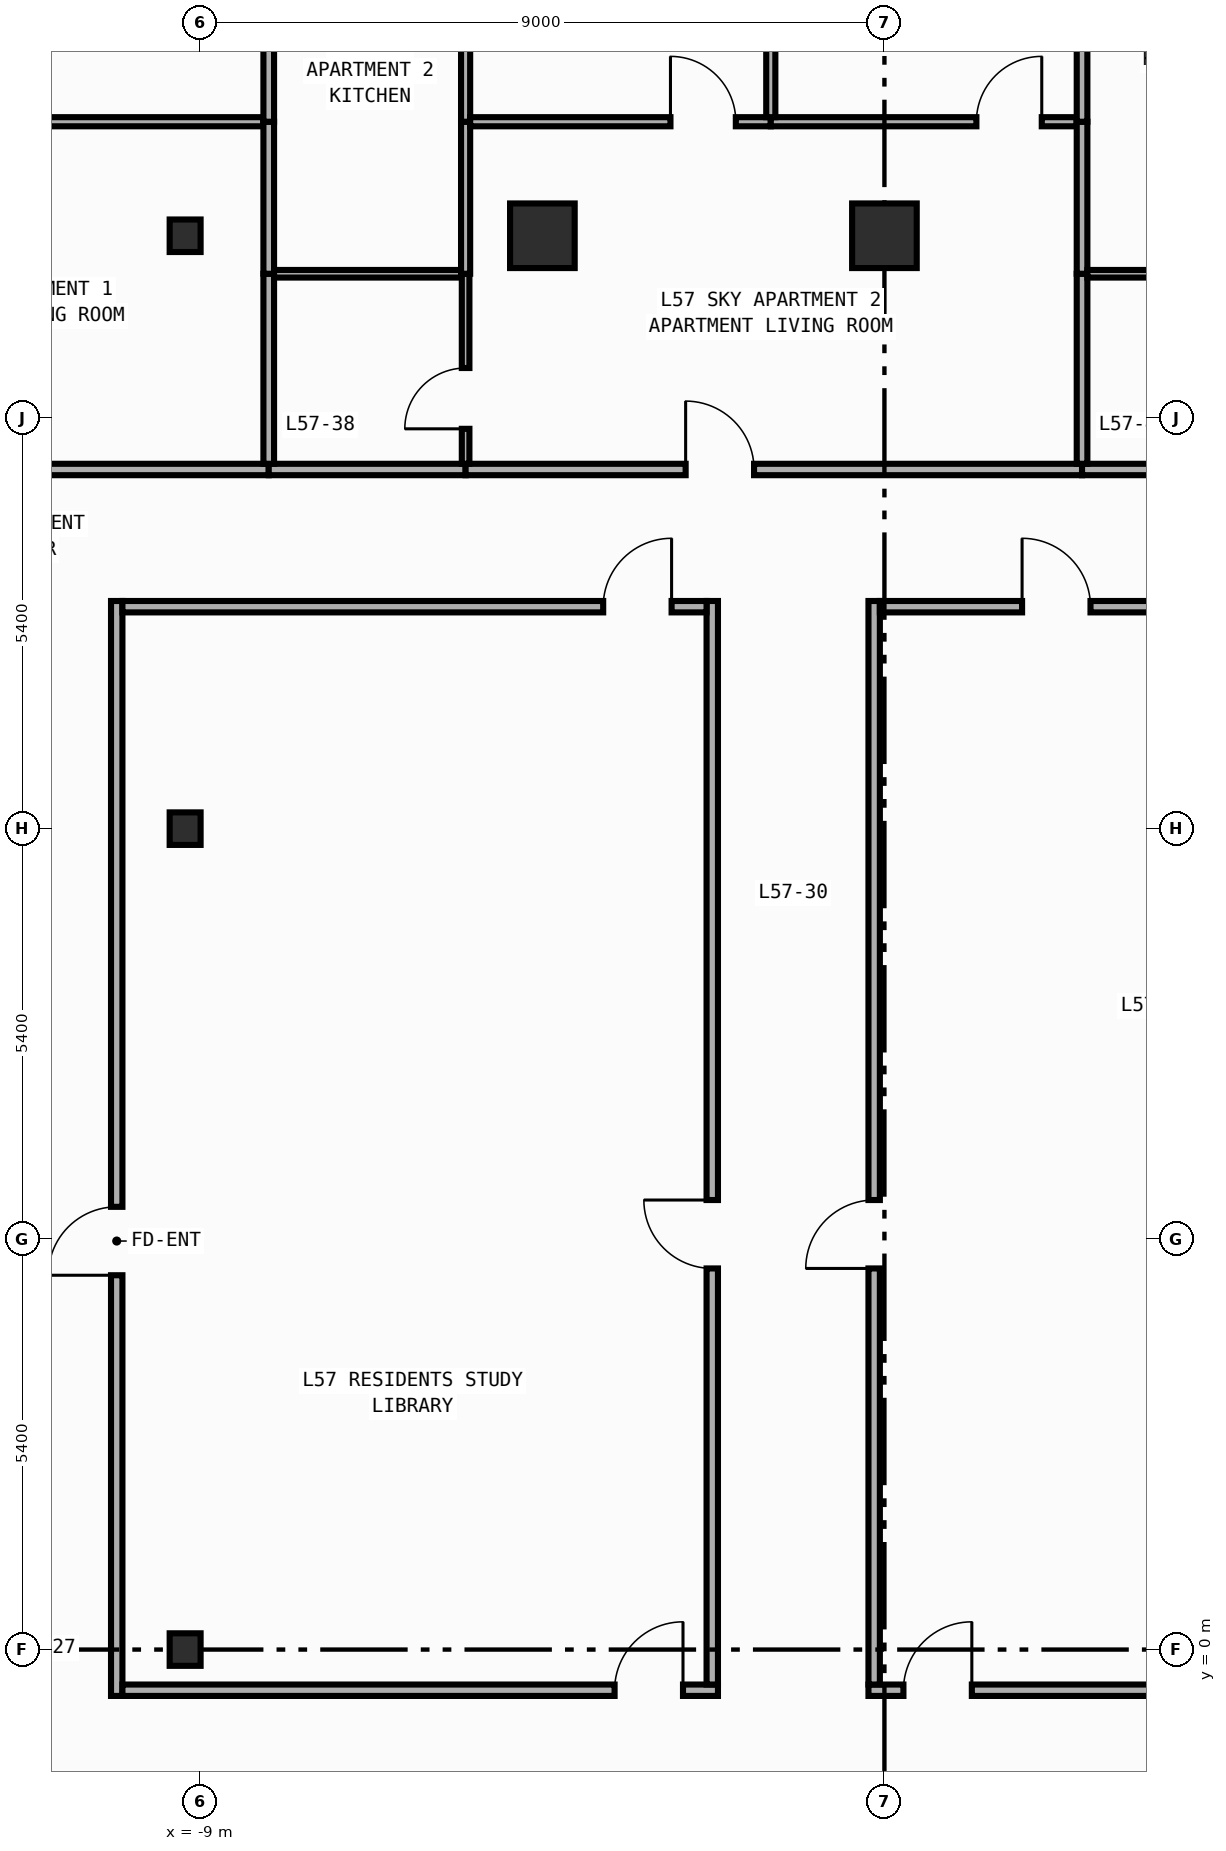
"""IFC4 building model, lengths in metres.
Left out: names, types, materials, properties, quantities, classifications, styles, units other than length and angle.
Written with IfcOpenShell. Run it as: python <this file> out.ifc"""

import sys

from ifc_helpers import new_model, si_unit, direction, frame, frame_2d, origin, origin_2d, place, context, subcontext, project, spatial, rectangle, i_section, extrude, element, fill, save


model = new_model("IFC4")
c1 = context("Model", 3, precision=1e-05, world=origin(), true_north=direction((0.0, 1.0)))
c2 = subcontext(c1, "Body", "Model", "MODEL_VIEW")
j1 = project(units=[si_unit("LENGTHUNIT", "METRE"), si_unit("PLANEANGLEUNIT", "RADIAN")], contexts=[c1])
p1 = place(None, origin())
s1 = spatial("IfcSite", under=j1, at=p1, CompositionType="ELEMENT")
p2 = place(p1, origin())
s2 = spatial("IfcBuilding", under=s1, at=p2, CompositionType="ELEMENT")
p3 = place(p2, frame((0.0, 0.0, 244.0)))
s3 = spatial("IfcBuildingStorey", under=s2, at=p3, CompositionType="ELEMENT", Elevation=244.0)
for number, where, z_axis, x_axis in (
    (1, (-9.2, 0.0, 0.0), (0.0, 0.0, 1.0), (1.0, 0.0, 0.0)),
    (2, (-9.2, 10.8, 0.0), (0.0, 0.0, 1.0), (1.0, 0.0, 0.0)),
    (3, (-9.2, 18.6, 0.0), (0.0, 0.0, 1.0), (1.0, 0.0, 0.0)),
):
    element("IfcColumn", number, at=place(p3, frame(where, z_axis=z_axis, x_axis=x_axis)), inside=s3, PredefinedType="COLUMN", context=c2, shape_type="SweptSolid", body=[
        extrude(i_section(OverallWidth=0.407, OverallDepth=0.428, WebThickness=0.02, FlangeThickness=0.035, FilletRadius=0.022, at=origin_2d()), origin(), (0.0, 0.0, 1.0), 3.6),
    ])
for number, where, z_axis, x_axis in (
    (4, (-4.5, 18.6, 0.0), (0.0, 0.0, 1.0), (1.0, 0.0, 0.0)),
    (5, (0.0, 18.6, 0.0), (0.0, 0.0, 1.0), (1.0, 0.0, 0.0)),
):
    element("IfcColumn", number, at=place(p3, frame(where, z_axis=z_axis, x_axis=x_axis)), inside=s3, PredefinedType="COLUMN", context=c2, shape_type="SweptSolid", body=[
        extrude(rectangle(XDim=0.85, YDim=0.85, at=origin_2d()), origin(), (0.0, 0.0, 1.0), 3.6),
    ])
p4 = place(p3, frame((-10.1, -0.61, 0.0), z_axis=(0.0, 0.0, 1.0), x_axis=(0.0, 1.0, 0.0)))
e6 = element("IfcWall", 6, at=p4, inside=s3, PredefinedType="PARTITIONING", context=c2, shape_type="SweptSolid", body=[
    extrude(rectangle(XDim=14.405, YDim=0.15, at=frame_2d((7.203, 0.0))), origin(), (0.0, 0.0, 1.0), 3.34),
])
p5 = place(p4, frame((5.535, 0.0, 0.0)))
e7 = element("IfcOpeningElement", 7, at=p5, cuts=e6, PredefinedType="OPENING", context=c2, shape_type="SweptSolid", body=[
    extrude(rectangle(XDim=0.9, YDim=2.15, at=frame_2d((0.45, 1.075))), frame((0.0, 0.085, 0.0), z_axis=(0.0, -1.0, 0.0), x_axis=(1.0, 0.0, 0.0)), (0.0, 0.0, 1.0), 0.17),
])
p6 = place(p3, frame((-10.025, -0.535, 0.0), z_axis=(0.0, 0.0, 1.0), x_axis=(1.0, 0.0, 0.0)))
e8 = element("IfcWall", 8, at=p6, inside=s3, PredefinedType="PARTITIONING", context=c2, shape_type="SweptSolid", body=[
    extrude(rectangle(XDim=7.835, YDim=0.15, at=frame_2d((3.917, 0.0))), origin(), (0.0, 0.0, 1.0), 3.34),
])
p7 = place(p6, frame((6.475, 0.0, 0.0)))
e9 = element("IfcOpeningElement", 9, at=p7, cuts=e8, PredefinedType="OPENING", context=c2, shape_type="SweptSolid", body=[
    extrude(rectangle(XDim=0.9, YDim=2.15, at=frame_2d((0.45, 1.075))), frame((0.0, 0.085, 0.0), z_axis=(0.0, -1.0, 0.0), x_axis=(1.0, 0.0, 0.0)), (0.0, 0.0, 1.0), 0.17),
])
p8 = place(p3, frame((-0.21, -0.535, 0.0), z_axis=(0.0, 0.0, 1.0), x_axis=(1.0, 0.0, 0.0)))
e10 = element("IfcWall", 10, at=p8, inside=s3, PredefinedType="PARTITIONING", context=c2, shape_type="SweptSolid", body=[
    extrude(rectangle(XDim=10.235, YDim=0.15, at=frame_2d((5.117, 0.0))), origin(), (0.0, 0.0, 1.0), 3.34),
])
p9 = place(p8, frame((0.46, 0.0, 0.0)))
e11 = element("IfcOpeningElement", 11, at=p9, cuts=e10, PredefinedType="OPENING", context=c2, shape_type="SweptSolid", body=[
    extrude(rectangle(XDim=0.9, YDim=2.15, at=frame_2d((0.45, 1.075))), frame((0.0, 0.085, 0.0), z_axis=(0.0, -1.0, 0.0), x_axis=(1.0, 0.0, 0.0)), (0.0, 0.0, 1.0), 0.17),
])
p10 = place(p3, frame((-2.265, -0.46, 0.0), z_axis=(0.0, 0.0, 1.0), x_axis=(0.0, 1.0, 0.0)))
e12 = element("IfcWall", 12, at=p10, inside=s3, PredefinedType="PARTITIONING", context=c2, shape_type="SweptSolid", body=[
    extrude(rectangle(XDim=14.255, YDim=0.15, at=frame_2d((7.127, 0.0))), origin(), (0.0, 0.0, 1.0), 3.34),
])
p11 = place(p10, frame((5.474, 0.0, 0.0)))
e13 = element("IfcOpeningElement", 13, at=p11, cuts=e12, PredefinedType="OPENING", context=c2, shape_type="SweptSolid", body=[
    extrude(rectangle(XDim=0.9, YDim=2.15, at=frame_2d((0.45, 1.075))), frame((0.0, 0.085, 0.0), z_axis=(0.0, -1.0, 0.0), x_axis=(1.0, 0.0, 0.0)), (0.0, 0.0, 1.0), 0.17),
])
p12 = place(p3, frame((-0.135, -0.46, 0.0), z_axis=(0.0, 0.0, 1.0), x_axis=(0.0, 1.0, 0.0)))
e14 = element("IfcWall", 14, at=p12, inside=s3, PredefinedType="PARTITIONING", context=c2, shape_type="SweptSolid", body=[
    extrude(rectangle(XDim=14.255, YDim=0.15, at=frame_2d((7.127, 0.0))), origin(), (0.0, 0.0, 1.0), 3.34),
])
p13 = place(p12, frame((5.474, 0.0, 0.0)))
e15 = element("IfcOpeningElement", 15, at=p13, cuts=e14, PredefinedType="OPENING", context=c2, shape_type="SweptSolid", body=[
    extrude(rectangle(XDim=0.9, YDim=2.15, at=frame_2d((0.45, 1.075))), frame((0.0, 0.085, 0.0), z_axis=(0.0, -1.0, 0.0), x_axis=(1.0, 0.0, 0.0)), (0.0, 0.0, 1.0), 0.17),
])
p14 = place(p3, frame((-19.31, 15.525, 0.0), z_axis=(0.0, 0.0, 1.0), x_axis=(1.0, 0.0, 0.0)))
e16 = element("IfcWall", 16, at=p14, inside=s3, PredefinedType="PARTITIONING", context=c2, shape_type="SweptSolid", body=[
    extrude(rectangle(XDim=11.21, YDim=0.15, at=frame_2d((5.605, 0.0))), origin(), (0.0, 0.0, 1.0), 3.34),
])
p15 = place(p14, frame((1.481, 0.0, 0.0)))
e17 = element("IfcOpeningElement", 17, at=p15, cuts=e16, PredefinedType="OPENING", context=c2, shape_type="SweptSolid", body=[
    extrude(rectangle(XDim=0.9, YDim=2.15, at=frame_2d((0.45, 1.075))), frame((0.0, 0.085, 0.0), z_axis=(0.0, -1.0, 0.0), x_axis=(1.0, 0.0, 0.0)), (0.0, 0.0, 1.0), 0.17),
])
p16 = place(p3, frame((-8.1, 15.525, 0.0), z_axis=(0.0, 0.0, 1.0), x_axis=(1.0, 0.0, 0.0)))
e18 = element("IfcWall", 18, at=p16, inside=s3, PredefinedType="PARTITIONING", context=c2, shape_type="SweptSolid", body=[
    extrude(rectangle(XDim=2.59, YDim=0.15, at=frame_2d((1.295, 0.0))), origin(), (0.0, 0.0, 1.0), 3.34),
])
p17 = place(p3, frame((-5.51, 15.525, 0.0), z_axis=(0.0, 0.0, 1.0), x_axis=(1.0, 0.0, 0.0)))
e19 = element("IfcWall", 19, at=p17, inside=s3, PredefinedType="PARTITIONING", context=c2, shape_type="SweptSolid", body=[
    extrude(rectangle(XDim=8.11, YDim=0.15, at=frame_2d((4.055, 0.0))), origin(), (0.0, 0.0, 1.0), 3.34),
])
p18 = place(p17, frame((2.895, 0.0, 0.0)))
e20 = element("IfcOpeningElement", 20, at=p18, cuts=e19, PredefinedType="OPENING", context=c2, shape_type="SweptSolid", body=[
    extrude(rectangle(XDim=0.9, YDim=2.15, at=frame_2d((0.45, 1.075))), frame((0.0, 0.085, 0.0), z_axis=(0.0, -1.0, 0.0), x_axis=(1.0, 0.0, 0.0)), (0.0, 0.0, 1.0), 0.17),
])
p19 = place(p3, frame((2.6, 15.525, 0.0), z_axis=(0.0, 0.0, 1.0), x_axis=(1.0, 0.0, 0.0)))
e21 = element("IfcWall", 21, at=p19, inside=s3, PredefinedType="PARTITIONING", context=c2, shape_type="SweptSolid", body=[
    extrude(rectangle(XDim=2.59, YDim=0.15, at=frame_2d((1.295, 0.0))), origin(), (0.0, 0.0, 1.0), 3.34),
])
p20 = place(p3, frame((-10.025, 13.72, 0.0), z_axis=(0.0, 0.0, 1.0), x_axis=(1.0, 0.0, 0.0)))
e22 = element("IfcWall", 22, at=p20, inside=s3, PredefinedType="PARTITIONING", context=c2, shape_type="SweptSolid", body=[
    extrude(rectangle(XDim=7.685, YDim=0.15, at=frame_2d((3.842, 0.0))), origin(), (0.0, 0.0, 1.0), 3.34),
])
p21 = place(p20, frame((6.325, 0.0, 0.0)))
e23 = element("IfcOpeningElement", 23, at=p21, cuts=e22, PredefinedType="OPENING", context=c2, shape_type="SweptSolid", body=[
    extrude(rectangle(XDim=0.9, YDim=2.15, at=frame_2d((0.45, 1.075))), frame((0.0, 0.085, 0.0), z_axis=(0.0, -1.0, 0.0), x_axis=(1.0, 0.0, 0.0)), (0.0, 0.0, 1.0), 0.17),
])
p22 = place(p3, frame((-0.06, 13.72, 0.0), z_axis=(0.0, 0.0, 1.0), x_axis=(1.0, 0.0, 0.0)))
e24 = element("IfcWall", 24, at=p22, inside=s3, PredefinedType="PARTITIONING", context=c2, shape_type="SweptSolid", body=[
    extrude(rectangle(XDim=10.085, YDim=0.15, at=frame_2d((5.042, 0.0))), origin(), (0.0, 0.0, 1.0), 3.34),
])
p23 = place(p22, frame((1.871, 0.0, 0.0)))
e25 = element("IfcOpeningElement", 25, at=p23, cuts=e24, PredefinedType="OPENING", context=c2, shape_type="SweptSolid", body=[
    extrude(rectangle(XDim=0.9, YDim=2.15, at=frame_2d((0.45, 1.075))), frame((0.0, 0.085, 0.0), z_axis=(0.0, -1.0, 0.0), x_axis=(1.0, 0.0, 0.0)), (0.0, 0.0, 1.0), 0.17),
])
p24 = place(p3, frame((-13.745, 20.1, 0.0), z_axis=(0.0, 0.0, 1.0), x_axis=(1.0, 0.0, 0.0)))
e26 = element("IfcWall", 26, at=p24, inside=s3, PredefinedType="PARTITIONING", context=c2, shape_type="SweptSolid", body=[
    extrude(rectangle(XDim=5.575, YDim=0.12, at=frame_2d((2.788, 0.0))), origin(), (0.0, 0.0, 1.0), 3.34),
])
p25 = place(p24, frame((1.725, 0.0, 0.0)))
e27 = element("IfcOpeningElement", 27, at=p25, cuts=e26, PredefinedType="OPENING", context=c2, shape_type="SweptSolid", body=[
    extrude(rectangle(XDim=0.86, YDim=2.15, at=frame_2d((0.43, 1.075))), frame((0.0, 0.07, 0.0), z_axis=(0.0, -1.0, 0.0), x_axis=(1.0, 0.0, 0.0)), (0.0, 0.0, 1.0), 0.14),
])
p26 = place(p3, frame((-8.1, 15.6, 0.0), z_axis=(0.0, 0.0, 1.0), x_axis=(0.0, 1.0, 0.0)))
e28 = element("IfcWall", 28, at=p26, inside=s3, PredefinedType="PARTITIONING", context=c2, shape_type="SweptSolid", body=[
    extrude(rectangle(XDim=2.5, YDim=0.14, at=frame_2d((1.25, 0.0))), origin(), (0.0, 0.0, 1.0), 3.34),
])
p27 = place(p3, frame((-8.1, 18.1, 0.0), z_axis=(0.0, 0.0, 1.0), x_axis=(0.0, 1.0, 0.0)))
e29 = element("IfcWall", 29, at=p27, inside=s3, PredefinedType="PARTITIONING", context=c2, shape_type="SweptSolid", body=[
    extrude(rectangle(XDim=2.0, YDim=0.14, at=frame_2d((1.0, 0.0))), origin(), (0.0, 0.0, 1.0), 3.34),
])
p28 = place(p3, frame((-8.1, 20.1, 0.0), z_axis=(0.0, 0.0, 1.0), x_axis=(0.0, 1.0, 0.0)))
e30 = element("IfcWall", 30, at=p28, inside=s3, PredefinedType="PARTITIONING", context=c2, shape_type="SweptSolid", body=[
    extrude(rectangle(XDim=4.755, YDim=0.14, at=frame_2d((2.377, 0.0))), origin(), (0.0, 0.0, 1.0), 3.34),
])
p29 = place(p3, frame((-8.03, 18.1, 0.0), z_axis=(0.0, 0.0, 1.0), x_axis=(1.0, 0.0, 0.0)))
e31 = element("IfcWall", 31, at=p29, inside=s3, PredefinedType="PARTITIONING", context=c2, shape_type="SweptSolid", body=[
    extrude(rectangle(XDim=2.47, YDim=0.1, at=frame_2d((1.235, 0.0))), origin(), (0.0, 0.0, 1.0), 3.34),
])
p30 = place(p3, frame((-5.51, 15.6, 0.0), z_axis=(0.0, 0.0, 1.0), x_axis=(0.0, 1.0, 0.0)))
e32 = element("IfcWall", 32, at=p30, inside=s3, PredefinedType="PARTITIONING", context=c2, shape_type="SweptSolid", body=[
    extrude(rectangle(XDim=2.5, YDim=0.1, at=frame_2d((1.25, 0.0))), origin(), (0.0, 0.0, 1.0), 3.34),
])
p31 = place(p30, frame((0.46, 0.0, 0.0)))
e33 = element("IfcOpeningElement", 33, at=p31, cuts=e32, PredefinedType="OPENING", context=c2, shape_type="SweptSolid", body=[
    extrude(rectangle(XDim=0.8, YDim=2.1, at=frame_2d((0.4, 1.05))), frame((0.0, 0.06, 0.0), z_axis=(0.0, -1.0, 0.0), x_axis=(1.0, 0.0, 0.0)), (0.0, 0.0, 1.0), 0.12),
])
p32 = place(p3, frame((-5.51, 18.1, 0.0), z_axis=(0.0, 0.0, 1.0), x_axis=(0.0, 1.0, 0.0)))
e34 = element("IfcWall", 34, at=p32, inside=s3, PredefinedType="PARTITIONING", context=c2, shape_type="SweptSolid", body=[
    extrude(rectangle(XDim=2.0, YDim=0.12, at=frame_2d((1.0, 0.0))), origin(), (0.0, 0.0, 1.0), 3.34),
])
p33 = place(p3, frame((-5.51, 20.1, 0.0), z_axis=(0.0, 0.0, 1.0), x_axis=(0.0, 1.0, 0.0)))
e35 = element("IfcWall", 35, at=p33, inside=s3, PredefinedType="PARTITIONING", context=c2, shape_type="SweptSolid", body=[
    extrude(rectangle(XDim=4.755, YDim=0.12, at=frame_2d((2.377, 0.0))), origin(), (0.0, 0.0, 1.0), 3.34),
])
p34 = place(p33, frame((3.495, 0.0, 0.0)))
e36 = element("IfcOpeningElement", 36, at=p34, cuts=e35, PredefinedType="OPENING", context=c2, shape_type="SweptSolid", body=[
    extrude(rectangle(XDim=0.8, YDim=2.1, at=frame_2d((0.4, 1.05))), frame((0.0, 0.07, 0.0), z_axis=(0.0, -1.0, 0.0), x_axis=(1.0, 0.0, 0.0)), (0.0, 0.0, 1.0), 0.14),
])
p35 = place(p3, frame((-5.45, 20.1, 0.0), z_axis=(0.0, 0.0, 1.0), x_axis=(1.0, 0.0, 0.0)))
e37 = element("IfcWall", 37, at=p35, inside=s3, PredefinedType="PARTITIONING", context=c2, shape_type="SweptSolid", body=[
    extrude(rectangle(XDim=3.955, YDim=0.12, at=frame_2d((1.978, 0.0))), origin(), (0.0, 0.0, 1.0), 3.34),
])
p36 = place(p35, frame((2.635, 0.0, 0.0)))
e38 = element("IfcOpeningElement", 38, at=p36, cuts=e37, PredefinedType="OPENING", context=c2, shape_type="SweptSolid", body=[
    extrude(rectangle(XDim=0.86, YDim=2.15, at=frame_2d((0.43, 1.075))), frame((0.0, 0.07, 0.0), z_axis=(0.0, -1.0, 0.0), x_axis=(1.0, 0.0, 0.0)), (0.0, 0.0, 1.0), 0.14),
])
p37 = place(p3, frame((-1.495, 20.1, 0.0), z_axis=(0.0, 0.0, 1.0), x_axis=(1.0, 0.0, 0.0)))
e39 = element("IfcWall", 39, at=p37, inside=s3, PredefinedType="PARTITIONING", context=c2, shape_type="SweptSolid", body=[
    extrude(rectangle(XDim=4.025, YDim=0.12, at=frame_2d((2.013, 0.0))), origin(), (0.0, 0.0, 1.0), 3.34),
])
p38 = place(p37, frame((2.705, 0.0, 0.0)))
e40 = element("IfcOpeningElement", 40, at=p38, cuts=e39, PredefinedType="OPENING", context=c2, shape_type="SweptSolid", body=[
    extrude(rectangle(XDim=0.86, YDim=2.15, at=frame_2d((0.43, 1.075))), frame((0.0, 0.07, 0.0), z_axis=(0.0, -1.0, 0.0), x_axis=(1.0, 0.0, 0.0)), (0.0, 0.0, 1.0), 0.14),
])
p39 = place(p3, frame((2.6, 15.6, 0.0), z_axis=(0.0, 0.0, 1.0), x_axis=(0.0, 1.0, 0.0)))
e41 = element("IfcWall", 41, at=p39, inside=s3, PredefinedType="PARTITIONING", context=c2, shape_type="SweptSolid", body=[
    extrude(rectangle(XDim=2.5, YDim=0.14, at=frame_2d((1.25, 0.0))), origin(), (0.0, 0.0, 1.0), 3.34),
])
p40 = place(p3, frame((2.6, 18.1, 0.0), z_axis=(0.0, 0.0, 1.0), x_axis=(0.0, 1.0, 0.0)))
e42 = element("IfcWall", 42, at=p40, inside=s3, PredefinedType="PARTITIONING", context=c2, shape_type="SweptSolid", body=[
    extrude(rectangle(XDim=2.0, YDim=0.14, at=frame_2d((1.0, 0.0))), origin(), (0.0, 0.0, 1.0), 3.34),
])
p41 = place(p3, frame((-1.495, 20.16, 0.0), z_axis=(0.0, 0.0, 1.0), x_axis=(0.0, 1.0, 0.0)))
e43 = element("IfcWall", 43, at=p41, inside=s3, PredefinedType="PARTITIONING", context=c2, shape_type="SweptSolid", body=[
    extrude(rectangle(XDim=4.695, YDim=0.12, at=frame_2d((2.348, 0.0))), origin(), (0.0, 0.0, 1.0), 3.34),
])
p42 = place(p3, frame((2.6, 20.1, 0.0), z_axis=(0.0, 0.0, 1.0), x_axis=(0.0, 1.0, 0.0)))
e44 = element("IfcWall", 44, at=p42, inside=s3, PredefinedType="PARTITIONING", context=c2, shape_type="SweptSolid", body=[
    extrude(rectangle(XDim=4.755, YDim=0.14, at=frame_2d((2.377, 0.0))), origin(), (0.0, 0.0, 1.0), 3.34),
])
p43 = place(p3, frame((2.67, 18.1, 0.0), z_axis=(0.0, 0.0, 1.0), x_axis=(1.0, 0.0, 0.0)))
e45 = element("IfcWall", 45, at=p43, inside=s3, PredefinedType="PARTITIONING", context=c2, shape_type="SweptSolid", body=[
    extrude(rectangle(XDim=2.47, YDim=0.1, at=frame_2d((1.235, 0.0))), origin(), (0.0, 0.0, 1.0), 3.34),
])
p44 = place(p5, origin())
e46 = element("IfcDoor", 46, at=p44, inside=s3, OperationType="SINGLE_SWING_LEFT", PredefinedType="DOOR", context=c2, shape_type="SweptSolid", body=[
    extrude(rectangle(XDim=0.9, YDim=2.15, at=frame_2d((0.45, 1.075))), frame((0.0, 0.025, 0.0), z_axis=(0.0, -1.0, 0.0), x_axis=(1.0, 0.0, 0.0)), (0.0, 0.0, 1.0), 0.05),
])
fill(e7, e46)
p45 = place(p7, origin())
e47 = element("IfcDoor", 47, at=p45, inside=s3, OperationType="SINGLE_SWING_RIGHT", PredefinedType="DOOR", context=c2, shape_type="SweptSolid", body=[
    extrude(rectangle(XDim=0.9, YDim=2.15, at=frame_2d((0.45, 1.075))), frame((0.0, 0.025, 0.0), z_axis=(0.0, -1.0, 0.0), x_axis=(1.0, 0.0, 0.0)), (0.0, 0.0, 1.0), 0.05),
])
fill(e9, e47)
p46 = place(p9, origin())
e48 = element("IfcDoor", 48, at=p46, inside=s3, OperationType="SINGLE_SWING_RIGHT", PredefinedType="DOOR", context=c2, shape_type="SweptSolid", body=[
    extrude(rectangle(XDim=0.9, YDim=2.15, at=frame_2d((0.45, 1.075))), frame((0.0, 0.025, 0.0), z_axis=(0.0, -1.0, 0.0), x_axis=(1.0, 0.0, 0.0)), (0.0, 0.0, 1.0), 0.05),
])
fill(e11, e48)
p47 = place(p11, origin())
e49 = element("IfcDoor", 49, at=p47, inside=s3, OperationType="SINGLE_SWING_RIGHT", PredefinedType="DOOR", context=c2, shape_type="SweptSolid", body=[
    extrude(rectangle(XDim=0.9, YDim=2.15, at=frame_2d((0.45, 1.075))), frame((0.0, 0.025, 0.0), z_axis=(0.0, -1.0, 0.0), x_axis=(1.0, 0.0, 0.0)), (0.0, 0.0, 1.0), 0.05),
])
fill(e13, e49)
p48 = place(p13, origin())
e50 = element("IfcDoor", 50, at=p48, inside=s3, OperationType="SINGLE_SWING_LEFT", PredefinedType="DOOR", context=c2, shape_type="SweptSolid", body=[
    extrude(rectangle(XDim=0.9, YDim=2.15, at=frame_2d((0.45, 1.075))), frame((0.0, 0.025, 0.0), z_axis=(0.0, -1.0, 0.0), x_axis=(1.0, 0.0, 0.0)), (0.0, 0.0, 1.0), 0.05),
])
fill(e15, e50)
p49 = place(p18, origin())
e51 = element("IfcDoor", 51, at=p49, inside=s3, OperationType="SINGLE_SWING_LEFT", PredefinedType="DOOR", context=c2, shape_type="SweptSolid", body=[
    extrude(rectangle(XDim=0.9, YDim=2.15, at=frame_2d((0.45, 1.075))), frame((0.0, 0.025, 0.0), z_axis=(0.0, -1.0, 0.0), x_axis=(1.0, 0.0, 0.0)), (0.0, 0.0, 1.0), 0.05),
])
fill(e20, e51)
p50 = place(p21, origin())
e52 = element("IfcDoor", 52, at=p50, inside=s3, OperationType="SINGLE_SWING_RIGHT", PredefinedType="DOOR", context=c2, shape_type="SweptSolid", body=[
    extrude(rectangle(XDim=0.9, YDim=2.15, at=frame_2d((0.45, 1.075))), frame((0.0, 0.025, 0.0), z_axis=(0.0, -1.0, 0.0), x_axis=(1.0, 0.0, 0.0)), (0.0, 0.0, 1.0), 0.05),
])
fill(e23, e52)
p51 = place(p23, origin())
e53 = element("IfcDoor", 53, at=p51, inside=s3, OperationType="SINGLE_SWING_LEFT", PredefinedType="DOOR", context=c2, shape_type="SweptSolid", body=[
    extrude(rectangle(XDim=0.9, YDim=2.15, at=frame_2d((0.45, 1.075))), frame((0.0, 0.025, 0.0), z_axis=(0.0, -1.0, 0.0), x_axis=(1.0, 0.0, 0.0)), (0.0, 0.0, 1.0), 0.05),
])
fill(e25, e53)
p52 = place(p31, origin())
e54 = element("IfcDoor", 54, at=p52, inside=s3, OperationType="SINGLE_SWING_LEFT", PredefinedType="DOOR", context=c2, shape_type="SweptSolid", body=[
    extrude(rectangle(XDim=0.8, YDim=2.1, at=frame_2d((0.4, 1.05))), frame((0.0, 0.025, 0.0), z_axis=(0.0, -1.0, 0.0), x_axis=(1.0, 0.0, 0.0)), (0.0, 0.0, 1.0), 0.05),
])
fill(e33, e54)
p53 = place(p36, origin())
e55 = element("IfcDoor", 55, at=p53, inside=s3, OperationType="SINGLE_SWING_LEFT", PredefinedType="DOOR", context=c2, shape_type="SweptSolid", body=[
    extrude(rectangle(XDim=0.86, YDim=2.15, at=frame_2d((0.43, 1.075))), frame((0.0, 0.025, 0.0), z_axis=(0.0, -1.0, 0.0), x_axis=(1.0, 0.0, 0.0)), (0.0, 0.0, 1.0), 0.05),
])
fill(e38, e55)
p54 = place(p38, origin())
e56 = element("IfcDoor", 56, at=p54, inside=s3, OperationType="SINGLE_SWING_RIGHT", PredefinedType="DOOR", context=c2, shape_type="SweptSolid", body=[
    extrude(rectangle(XDim=0.86, YDim=2.15, at=frame_2d((0.43, 1.075))), frame((0.0, 0.025, 0.0), z_axis=(0.0, -1.0, 0.0), x_axis=(1.0, 0.0, 0.0)), (0.0, 0.0, 1.0), 0.05),
])
fill(e40, e56)
save(model, sys.argv[1])
